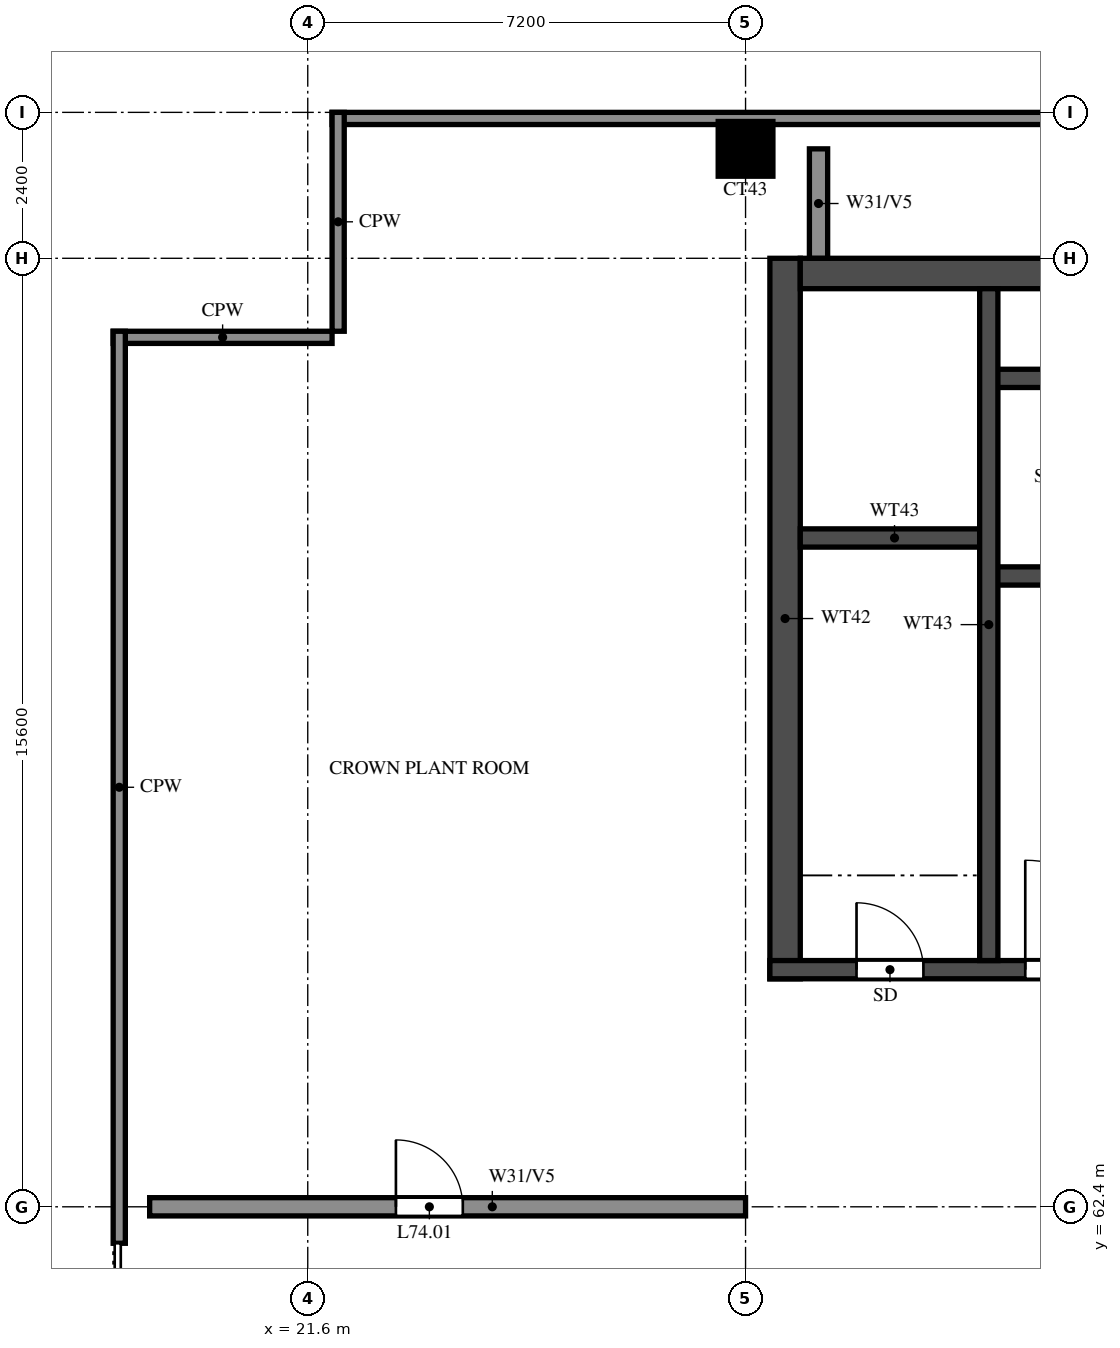
"""IFC4 building model, lengths in metres.
Left out: names, types, materials, properties, quantities, classifications, styles, units other than length and angle.
Written with IfcOpenShell. Run it as: python <this file> out.ifc"""

import sys

from ifc_helpers import new_model, si_unit, direction, frame, frame_2d, origin, origin_2d, place, context, subcontext, project, spatial, rectangle, extrude, source, transform, mapped, element, fill, save


model = new_model("IFC4")
c1 = context("Model", 3, precision=1e-05, world=origin(), true_north=direction((0.0, 1.0)))
c2 = subcontext(c1, "Body", "Model", "MODEL_VIEW")
j1 = project(units=[si_unit("LENGTHUNIT", "METRE"), si_unit("PLANEANGLEUNIT", "RADIAN")], contexts=[c1])
p1 = place(None, origin())
s1 = spatial("IfcSite", under=j1, at=p1, CompositionType="ELEMENT")
p2 = place(p1, origin())
s2 = spatial("IfcBuilding", under=s1, at=p2, CompositionType="ELEMENT")
p3 = place(p2, frame((0.0, 0.0, 274.5)))
s3 = spatial("IfcBuildingStorey", under=s2, at=p3, CompositionType="ELEMENT", Elevation=274.5)
m1 = source(origin(), c2, "Body", "SweptSolid", [
    extrude(rectangle(XDim=0.9, YDim=0.9, at=origin_2d()), origin(), (0.0, 0.0, 1.0), 7.0),
])
p4 = place(p3, frame((28.8, 79.8, 0.0), z_axis=(0.0, 0.0, 1.0), x_axis=(1.0, 0.0, 0.0)))
e1 = element("IfcColumn", 1, at=p4, inside=s3, PredefinedType="COLUMN", context=c2, shape_type="MappedRepresentation", body=[
    mapped(m1, transform((0.0, 0.0, 0.0))),
])
p5 = place(p3, frame((29.45, 66.15, 0.0), z_axis=(0.0, 0.0, 1.0), x_axis=(0.0, 1.0, 0.0)))
e2 = element("IfcWall", 2, at=p5, inside=s3, PredefinedType="SHEAR", context=c2, shape_type="SweptSolid", body=[
    extrude(rectangle(XDim=11.85, YDim=0.5, at=frame_2d((5.925, 0.0))), origin(), (0.0, 0.0, 1.0), 7.0),
])
p6 = place(p3, frame((29.7, 77.75, 0.0), z_axis=(0.0, 0.0, 1.0), x_axis=(1.0, 0.0, 0.0)))
e3 = element("IfcWall", 3, at=p6, inside=s3, PredefinedType="SHEAR", context=c2, shape_type="SweptSolid", body=[
    extrude(rectangle(XDim=41.4, YDim=0.5, at=frame_2d((20.7, 0.0))), origin(), (0.0, 0.0, 1.0), 7.0),
])
p7 = place(p3, frame((29.2, 66.3, 0.0), z_axis=(0.0, 0.0, 1.0), x_axis=(1.0, 0.0, 0.0)))
e4 = element("IfcWall", 4, at=p7, inside=s3, PredefinedType="SHEAR", context=c2, shape_type="SweptSolid", body=[
    extrude(rectangle(XDim=42.4, YDim=0.3, at=frame_2d((21.2, 0.0))), origin(), (0.0, 0.0, 1.0), 7.0),
])
p8 = place(p7, frame((1.425, 0.0, 0.0)))
e5 = element("IfcOpeningElement", 5, at=p8, cuts=e4, PredefinedType="OPENING", context=c2, shape_type="SweptSolid", body=[
    extrude(rectangle(XDim=1.1, YDim=2.1, at=frame_2d((0.55, 1.05))), frame((0.0, 0.16, 0.0), z_axis=(0.0, -1.0, 0.0), x_axis=(1.0, 0.0, 0.0)), (0.0, 0.0, 1.0), 0.32),
])
p9 = place(p7, frame((4.2, 0.0, 0.0)))
e6 = element("IfcOpeningElement", 6, at=p9, cuts=e4, PredefinedType="OPENING", context=c2, shape_type="SweptSolid", body=[
    extrude(rectangle(XDim=1.8, YDim=2.1, at=frame_2d((0.9, 1.05))), frame((0.0, 0.16, 0.0), z_axis=(0.0, -1.0, 0.0), x_axis=(1.0, 0.0, 0.0)), (0.0, 0.0, 1.0), 0.32),
])
p10 = place(p3, frame((32.8, 72.775, 0.0), z_axis=(0.0, 0.0, 1.0), x_axis=(1.0, 0.0, 0.0)))
e7 = element("IfcWall", 7, at=p10, inside=s3, PredefinedType="SHEAR", context=c2, shape_type="SweptSolid", body=[
    extrude(rectangle(XDim=35.2, YDim=0.3, at=frame_2d((17.6, 0.0))), origin(), (0.0, 0.0, 1.0), 7.0),
])
p11 = place(p10, frame((19.8, 0.0, 0.0)))
e8 = element("IfcOpeningElement", 8, at=p11, cuts=e7, PredefinedType="OPENING", context=c2, shape_type="SweptSolid", body=[
    extrude(rectangle(XDim=1.1, YDim=2.1, at=frame_2d((0.55, 1.05))), frame((0.0, 0.16, 0.0), z_axis=(0.0, -1.0, 0.0), x_axis=(1.0, 0.0, 0.0)), (0.0, 0.0, 1.0), 0.32),
])
p12 = place(p10, frame((27.725, 0.0, 0.0)))
e9 = element("IfcOpeningElement", 9, at=p12, cuts=e7, PredefinedType="OPENING", context=c2, shape_type="SweptSolid", body=[
    extrude(rectangle(XDim=1.1, YDim=2.1, at=frame_2d((0.55, 1.05))), frame((0.0, 0.16, 0.0), z_axis=(0.0, -1.0, 0.0), x_axis=(1.0, 0.0, 0.0)), (0.0, 0.0, 1.0), 0.32),
])
p13 = place(p10, frame((30.325, 0.0, 0.0)))
e10 = element("IfcOpeningElement", 10, at=p13, cuts=e7, PredefinedType="OPENING", context=c2, shape_type="SweptSolid", body=[
    extrude(rectangle(XDim=1.1, YDim=2.1, at=frame_2d((0.55, 1.05))), frame((0.0, 0.16, 0.0), z_axis=(0.0, -1.0, 0.0), x_axis=(1.0, 0.0, 0.0)), (0.0, 0.0, 1.0), 0.32),
])
p14 = place(p10, frame((0.95, 0.0, 0.0)))
e11 = element("IfcOpeningElement", 11, at=p14, cuts=e7, PredefinedType="OPENING", context=c2, shape_type="SweptSolid", body=[
    extrude(rectangle(XDim=1.1, YDim=2.1, at=frame_2d((0.55, 1.05))), frame((0.0, 0.16, 0.0), z_axis=(0.0, -1.0, 0.0), x_axis=(1.0, 0.0, 0.0)), (0.0, 0.0, 1.0), 0.32),
])
p15 = place(p3, frame((32.8, 76.025, 0.0), z_axis=(0.0, 0.0, 1.0), x_axis=(1.0, 0.0, 0.0)))
e12 = element("IfcWall", 12, at=p15, inside=s3, PredefinedType="SHEAR", context=c2, shape_type="SweptSolid", body=[
    extrude(rectangle(XDim=35.2, YDim=0.3, at=frame_2d((17.6, 0.0))), origin(), (0.0, 0.0, 1.0), 7.0),
])
p16 = place(p3, frame((29.7, 73.4, 0.0), z_axis=(0.0, 0.0, 1.0), x_axis=(1.0, 0.0, 0.0)))
e13 = element("IfcWall", 13, at=p16, inside=s3, PredefinedType="SHEAR", context=c2, shape_type="SweptSolid", body=[
    extrude(rectangle(XDim=3.1, YDim=0.3, at=frame_2d((1.55, 0.0))), origin(), (0.0, 0.0, 1.0), 7.0),
])
p17 = place(p3, frame((32.8, 66.45, 0.0), z_axis=(0.0, 0.0, 1.0), x_axis=(0.0, 1.0, 0.0)))
e14 = element("IfcWall", 14, at=p17, inside=s3, PredefinedType="SHEAR", context=c2, shape_type="SweptSolid", body=[
    extrude(rectangle(XDim=11.05, YDim=0.3, at=frame_2d((5.525, 0.0))), origin(), (0.0, 0.0, 1.0), 7.0),
])
p18 = place(p3, frame((78.8, 80.3, 0.0), z_axis=(0.0, 0.0, 1.0), x_axis=(-1.0, 0.0, 0.0)))
e15 = element("IfcWall", 15, at=p18, inside=s3, PredefinedType="SOLIDWALL", context=c2, shape_type="SweptSolid", body=[
    extrude(rectangle(XDim=56.8, YDim=0.2, at=frame_2d((28.4, 0.0))), origin(), (0.0, 0.0, 1.0), 7.0),
])
p19 = place(p3, frame((22.1, 80.4, 0.0), z_axis=(0.0, 0.0, 1.0), x_axis=(0.0, -1.0, 0.0)))
e16 = element("IfcWall", 16, at=p19, inside=s3, PredefinedType="SOLIDWALL", context=c2, shape_type="SweptSolid", body=[
    extrude(rectangle(XDim=3.6, YDim=0.2, at=frame_2d((1.8, 0.0))), origin(), (0.0, 0.0, 1.0), 7.0),
])
p20 = place(p3, frame((22.0, 76.7, 0.0), z_axis=(0.0, 0.0, 1.0), x_axis=(-1.0, 0.0, 0.0)))
e17 = element("IfcWall", 17, at=p20, inside=s3, PredefinedType="SOLIDWALL", context=c2, shape_type="SweptSolid", body=[
    extrude(rectangle(XDim=3.6, YDim=0.2, at=frame_2d((1.8, 0.0))), origin(), (0.0, 0.0, 1.0), 7.0),
])
p21 = place(p3, frame((18.5, 76.8, 0.0), z_axis=(0.0, 0.0, 1.0), x_axis=(0.0, -1.0, 0.0)))
e18 = element("IfcWall", 18, at=p21, inside=s3, PredefinedType="SOLIDWALL", context=c2, shape_type="SweptSolid", body=[
    extrude(rectangle(XDim=15.0, YDim=0.2, at=frame_2d((7.5, 0.0))), origin(), (0.0, 0.0, 1.0), 7.0),
])
p22 = place(p3, frame((19.0, 62.4, 0.0), z_axis=(0.0, 0.0, 1.0), x_axis=(1.0, 0.0, 0.0)))
e19 = element("IfcWall", 19, at=p22, inside=s3, PredefinedType="SOLIDWALL", context=c2, shape_type="SweptSolid", body=[
    extrude(rectangle(XDim=9.8, YDim=0.3, at=frame_2d((4.9, 0.0))), origin(), (0.0, 0.0, 1.0), 7.0),
])
p23 = place(p22, frame((4.05, 0.0, 0.0)))
e20 = element("IfcOpeningElement", 20, at=p23, cuts=e19, PredefinedType="OPENING", context=c2, shape_type="SweptSolid", body=[
    extrude(rectangle(XDim=1.1, YDim=2.1, at=frame_2d((0.55, 1.05))), frame((0.0, 0.16, 0.0), z_axis=(0.0, -1.0, 0.0), x_axis=(1.0, 0.0, 0.0)), (0.0, 0.0, 1.0), 0.32),
])
p24 = place(p3, frame((30.0, 78.002, 0.0), z_axis=(0.0, 0.0, 1.0), x_axis=(0.0, 1.0, 0.0)))
e21 = element("IfcWall", 21, at=p24, inside=s3, PredefinedType="SOLIDWALL", context=c2, shape_type="SweptSolid", body=[
    extrude(rectangle(XDim=1.798, YDim=0.3, at=frame_2d((0.899, 0.0))), origin(), (0.0, 0.0, 1.0), 7.0),
])
p25 = place(p8, origin())
e22 = element("IfcDoor", 22, at=p25, inside=s3, OperationType="SINGLE_SWING_LEFT", PredefinedType="DOOR", context=c2, shape_type="SweptSolid", body=[
    extrude(rectangle(XDim=1.1, YDim=2.1, at=frame_2d((0.55, 1.05))), frame((0.0, 0.025, 0.0), z_axis=(0.0, -1.0, 0.0), x_axis=(1.0, 0.0, 0.0)), (0.0, 0.0, 1.0), 0.05),
])
fill(e5, e22)
p26 = place(p9, origin())
e23 = element("IfcDoor", 23, at=p26, inside=s3, OperationType="DOUBLE_DOOR_SINGLE_SWING", PredefinedType="DOOR", context=c2, shape_type="SweptSolid", body=[
    extrude(rectangle(XDim=1.8, YDim=2.1, at=frame_2d((0.9, 1.05))), frame((0.0, 0.025, 0.0), z_axis=(0.0, -1.0, 0.0), x_axis=(1.0, 0.0, 0.0)), (0.0, 0.0, 1.0), 0.05),
])
fill(e6, e23)
p27 = place(p23, origin())
e24 = element("IfcDoor", 24, at=p27, inside=s3, OperationType="SINGLE_SWING_LEFT", PredefinedType="DOOR", context=c2, shape_type="SweptSolid", body=[
    extrude(rectangle(XDim=1.1, YDim=2.1, at=frame_2d((0.55, 1.05))), frame((0.0, 0.025, 0.0), z_axis=(0.0, -1.0, 0.0), x_axis=(1.0, 0.0, 0.0)), (0.0, 0.0, 1.0), 0.05),
])
fill(e20, e24)
save(model, sys.argv[1])
